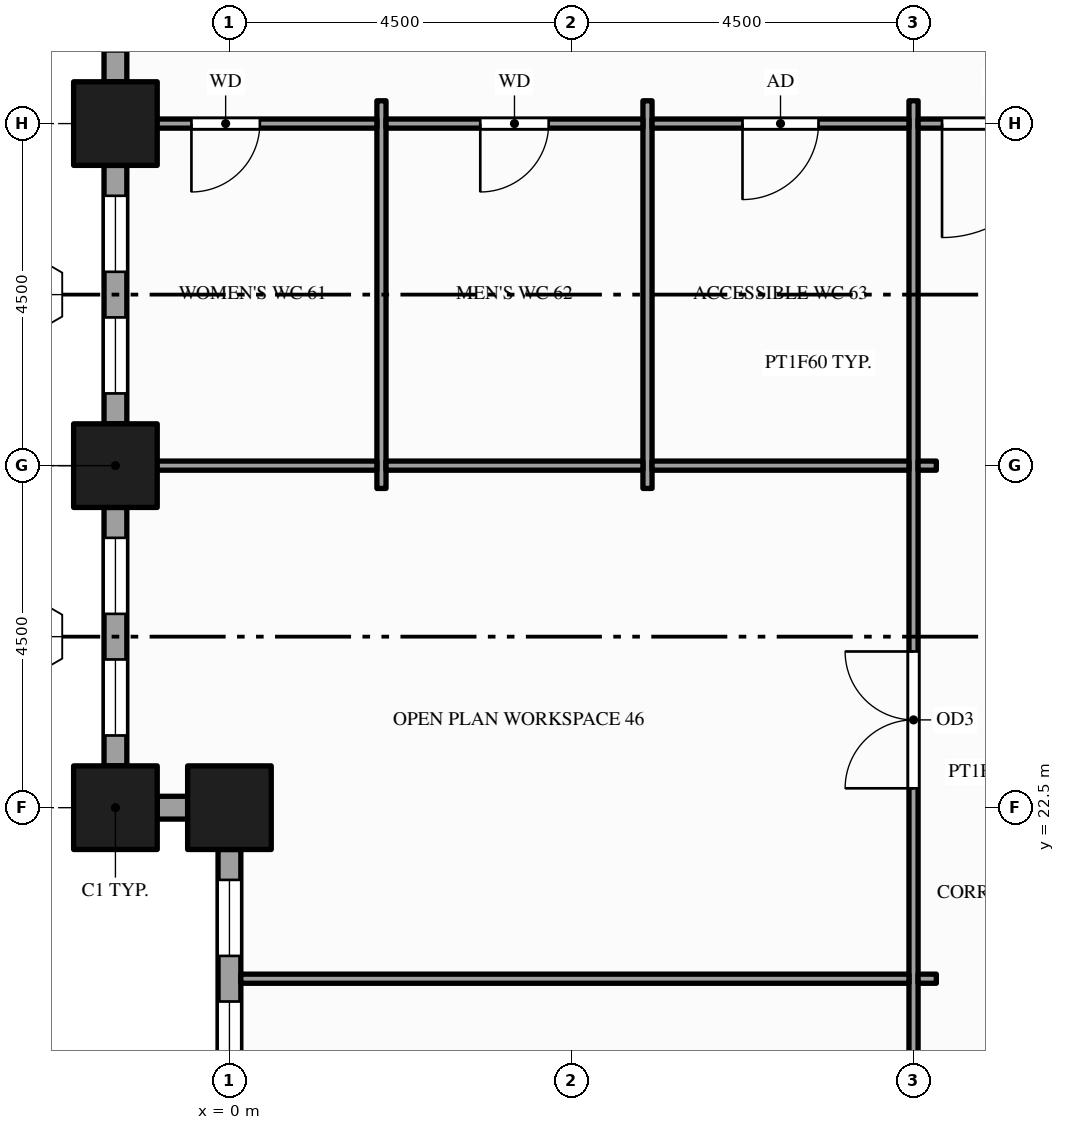
"""IFC4 building model, lengths in metres.
Left out: names, types, materials, properties, quantities, classifications, styles, units other than length and angle.
Written with IfcOpenShell. Run it as: python <this file> out.ifc"""

import sys

from ifc_helpers import new_model, si_unit, direction, frame, frame_2d, origin, origin_2d, place, context, subcontext, project, spatial, rectangle, hollow_rectangle, extrude, element, fill, save


model = new_model("IFC4")
c1 = context("Model", 3, precision=1e-05, world=origin(), true_north=direction((0.0, 1.0)))
c2 = subcontext(c1, "Body", "Model", "MODEL_VIEW")
j1 = project(units=[si_unit("LENGTHUNIT", "METRE"), si_unit("PLANEANGLEUNIT", "RADIAN")], contexts=[c1])
p1 = place(None, origin())
s1 = spatial("IfcSite", under=j1, at=p1, CompositionType="ELEMENT")
p2 = place(p1, origin())
s2 = spatial("IfcBuilding", under=s1, at=p2, CompositionType="ELEMENT")
p3 = place(p2, frame((0.0, 0.0, 33.0)))
s3 = spatial("IfcBuildingStorey", under=s2, at=p3, CompositionType="ELEMENT", Elevation=33.0)
for number, where, z_axis, x_axis in (
    (1, (-1.5, 22.5, -0.15), (0.0, 0.0, 1.0), (1.0, 0.0, 0.0)),
    (2, (-1.5, 27.0, -0.15), (0.0, 0.0, 1.0), (1.0, 0.0, 0.0)),
    (3, (-1.5, 31.5, -0.15), (0.0, 0.0, 1.0), (1.0, 0.0, 0.0)),
    (4, (0.0, 22.5, -0.15), (0.0, 0.0, 1.0), (1.0, 0.0, 0.0)),
):
    element("IfcColumn", number, at=place(p3, frame(where, z_axis=z_axis, x_axis=x_axis)), inside=s3, PredefinedType="COLUMN", context=c2, shape_type="SweptSolid", body=[
        extrude(hollow_rectangle(XDim=1.1, YDim=1.1, WallThickness=0.06, at=origin_2d()), origin(), (0.0, 0.0, 1.0), 4.0),
    ])
p4 = place(p3, frame((-1.5, 35.45, 0.0), z_axis=(0.0, 0.0, 1.0), x_axis=(0.0, -1.0, 0.0)))
e5 = element("IfcWall", 5, at=p4, inside=s3, PredefinedType="STANDARD", context=c2, shape_type="SweptSolid", body=[
    extrude(rectangle(XDim=3.4, YDim=0.3, at=frame_2d((1.7, 0.0))), origin(), (0.0, 0.0, 1.0), 3.144),
])
p5 = place(p4, frame((0.4, 0.0, 0.9)))
e6 = element("IfcOpeningElement", 6, at=p5, cuts=e5, PredefinedType="OPENING", context=c2, shape_type="SweptSolid", body=[
    extrude(rectangle(XDim=1.0, YDim=2.0, at=frame_2d((0.5, 1.0))), frame((0.0, 0.16, 0.0), z_axis=(0.0, -1.0, 0.0), x_axis=(1.0, 0.0, 0.0)), (0.0, 0.0, 1.0), 0.32),
])
p6 = place(p4, frame((2.0, 0.0, 0.9)))
e7 = element("IfcOpeningElement", 7, at=p6, cuts=e5, PredefinedType="OPENING", context=c2, shape_type="SweptSolid", body=[
    extrude(rectangle(XDim=1.0, YDim=2.0, at=frame_2d((0.5, 1.0))), frame((0.0, 0.16, 0.0), z_axis=(0.0, -1.0, 0.0), x_axis=(1.0, 0.0, 0.0)), (0.0, 0.0, 1.0), 0.32),
])
p7 = place(p3, frame((-1.5, 30.95, 0.0), z_axis=(0.0, 0.0, 1.0), x_axis=(0.0, -1.0, 0.0)))
e8 = element("IfcWall", 8, at=p7, inside=s3, PredefinedType="STANDARD", context=c2, shape_type="SweptSolid", body=[
    extrude(rectangle(XDim=3.4, YDim=0.3, at=frame_2d((1.7, 0.0))), origin(), (0.0, 0.0, 1.0), 3.144),
])
p8 = place(p7, frame((0.4, 0.0, 0.9)))
e9 = element("IfcOpeningElement", 9, at=p8, cuts=e8, PredefinedType="OPENING", context=c2, shape_type="SweptSolid", body=[
    extrude(rectangle(XDim=1.0, YDim=2.0, at=frame_2d((0.5, 1.0))), frame((0.0, 0.16, 0.0), z_axis=(0.0, -1.0, 0.0), x_axis=(1.0, 0.0, 0.0)), (0.0, 0.0, 1.0), 0.32),
])
p9 = place(p7, frame((2.0, 0.0, 0.9)))
e10 = element("IfcOpeningElement", 10, at=p9, cuts=e8, PredefinedType="OPENING", context=c2, shape_type="SweptSolid", body=[
    extrude(rectangle(XDim=1.0, YDim=2.0, at=frame_2d((0.5, 1.0))), frame((0.0, 0.16, 0.0), z_axis=(0.0, -1.0, 0.0), x_axis=(1.0, 0.0, 0.0)), (0.0, 0.0, 1.0), 0.32),
])
p10 = place(p3, frame((-1.5, 26.45, 0.0), z_axis=(0.0, 0.0, 1.0), x_axis=(0.0, -1.0, 0.0)))
e11 = element("IfcWall", 11, at=p10, inside=s3, PredefinedType="STANDARD", context=c2, shape_type="SweptSolid", body=[
    extrude(rectangle(XDim=3.4, YDim=0.3, at=frame_2d((1.7, 0.0))), origin(), (0.0, 0.0, 1.0), 3.144),
])
p11 = place(p10, frame((0.4, 0.0, 0.9)))
e12 = element("IfcOpeningElement", 12, at=p11, cuts=e11, PredefinedType="OPENING", context=c2, shape_type="SweptSolid", body=[
    extrude(rectangle(XDim=1.0, YDim=2.0, at=frame_2d((0.5, 1.0))), frame((0.0, 0.16, 0.0), z_axis=(0.0, -1.0, 0.0), x_axis=(1.0, 0.0, 0.0)), (0.0, 0.0, 1.0), 0.32),
])
p12 = place(p10, frame((2.0, 0.0, 0.9)))
e13 = element("IfcOpeningElement", 13, at=p12, cuts=e11, PredefinedType="OPENING", context=c2, shape_type="SweptSolid", body=[
    extrude(rectangle(XDim=1.0, YDim=2.0, at=frame_2d((0.5, 1.0))), frame((0.0, 0.16, 0.0), z_axis=(0.0, -1.0, 0.0), x_axis=(1.0, 0.0, 0.0)), (0.0, 0.0, 1.0), 0.32),
])
p13 = place(p3, frame((-0.95, 22.5, 0.0), z_axis=(0.0, 0.0, 1.0), x_axis=(1.0, 0.0, 0.0)))
e14 = element("IfcWall", 14, at=p13, inside=s3, PredefinedType="STANDARD", context=c2, shape_type="SweptSolid", body=[
    extrude(rectangle(XDim=0.4, YDim=0.3, at=frame_2d((0.2, 0.0))), origin(), (0.0, 0.0, 1.0), 3.144),
])
p14 = place(p3, frame((0.0, 21.95, 0.0), z_axis=(0.0, 0.0, 1.0), x_axis=(0.0, -1.0, 0.0)))
e15 = element("IfcWall", 15, at=p14, inside=s3, PredefinedType="STANDARD", context=c2, shape_type="SweptSolid", body=[
    extrude(rectangle(XDim=3.4, YDim=0.3, at=frame_2d((1.7, 0.0))), origin(), (0.0, 0.0, 1.0), 3.144),
])
p15 = place(p14, frame((0.4, 0.0, 0.9)))
e16 = element("IfcOpeningElement", 16, at=p15, cuts=e15, PredefinedType="OPENING", context=c2, shape_type="SweptSolid", body=[
    extrude(rectangle(XDim=1.0, YDim=2.0, at=frame_2d((0.5, 1.0))), frame((0.0, 0.16, 0.0), z_axis=(0.0, -1.0, 0.0), x_axis=(1.0, 0.0, 0.0)), (0.0, 0.0, 1.0), 0.32),
])
p16 = place(p14, frame((2.0, 0.0, 0.9)))
e17 = element("IfcOpeningElement", 17, at=p16, cuts=e15, PredefinedType="OPENING", context=c2, shape_type="SweptSolid", body=[
    extrude(rectangle(XDim=1.0, YDim=2.0, at=frame_2d((0.5, 1.0))), frame((0.0, 0.16, 0.0), z_axis=(0.0, -1.0, 0.0), x_axis=(1.0, 0.0, 0.0)), (0.0, 0.0, 1.0), 0.32),
])
for number, where, z_axis, x_axis in (
    (18, (2.0, 26.7, 0.0), (0.0, 0.0, 1.0), (0.0, 1.0, 0.0)),
    (19, (5.5, 26.7, 0.0), (0.0, 0.0, 1.0), (0.0, 1.0, 0.0)),
):
    element("IfcWall", number, at=place(p3, frame(where, z_axis=z_axis, x_axis=x_axis)), inside=s3, PredefinedType="PARTITIONING", context=c2, shape_type="SweptSolid", body=[
        extrude(rectangle(XDim=5.1, YDim=0.12, at=frame_2d((2.55, 0.0))), origin(), (0.0, 0.0, 1.0), 3.85),
    ])
p17 = place(p3, frame((9.0, 10.95, 0.0), z_axis=(0.0, 0.0, 1.0), x_axis=(0.0, 1.0, 0.0)))
e20 = element("IfcWall", 20, at=p17, inside=s3, PredefinedType="PARTITIONING", context=c2, shape_type="SweptSolid", body=[
    extrude(rectangle(XDim=20.85, YDim=0.12, at=frame_2d((10.425, 0.0))), origin(), (0.0, 0.0, 1.0), 2.6),
])
p18 = place(p17, frame((2.05, 0.0, 0.0)))
e21 = element("IfcOpeningElement", 21, at=p18, cuts=e20, PredefinedType="OPENING", context=c2, shape_type="SweptSolid", body=[
    extrude(rectangle(XDim=1.0, YDim=2.1, at=frame_2d((0.5, 1.05))), frame((0.0, 0.07, 0.0), z_axis=(0.0, -1.0, 0.0), x_axis=(1.0, 0.0, 0.0)), (0.0, 0.0, 1.0), 0.14),
])
p19 = place(p17, frame((6.6, 0.0, 0.0)))
e22 = element("IfcOpeningElement", 22, at=p19, cuts=e20, PredefinedType="OPENING", context=c2, shape_type="SweptSolid", body=[
    extrude(rectangle(XDim=0.9, YDim=2.1, at=frame_2d((0.45, 1.05))), frame((0.0, 0.07, 0.0), z_axis=(0.0, -1.0, 0.0), x_axis=(1.0, 0.0, 0.0)), (0.0, 0.0, 1.0), 0.14),
])
p20 = place(p17, frame((11.805, 0.0, 0.0)))
e23 = element("IfcOpeningElement", 23, at=p20, cuts=e20, PredefinedType="OPENING", context=c2, shape_type="SweptSolid", body=[
    extrude(rectangle(XDim=1.8, YDim=2.1, at=frame_2d((0.9, 1.05))), frame((0.0, 0.07, 0.0), z_axis=(0.0, -1.0, 0.0), x_axis=(1.0, 0.0, 0.0)), (0.0, 0.0, 1.0), 0.14),
])
p21 = place(p3, frame((0.15, 20.25, 0.0), z_axis=(0.0, 0.0, 1.0), x_axis=(1.0, 0.0, 0.0)))
e24 = element("IfcWall", 24, at=p21, inside=s3, PredefinedType="PARTITIONING", context=c2, shape_type="SweptSolid", body=[
    extrude(rectangle(XDim=8.79, YDim=0.12, at=frame_2d((4.395, 0.0))), origin(), (0.0, 0.0, 1.0), 2.938),
])
p22 = place(p3, frame((9.06, 20.25, 0.0), z_axis=(0.0, 0.0, 1.0), x_axis=(1.0, 0.0, 0.0)))
e25 = element("IfcWall", 25, at=p22, inside=s3, PredefinedType="PARTITIONING", context=c2, shape_type="SweptSolid", body=[
    extrude(rectangle(XDim=0.24, YDim=0.12, at=frame_2d((0.12, 0.0))), origin(), (0.0, 0.0, 1.0), 2.938),
])
p23 = place(p3, frame((-1.35, 27.0, 0.0), z_axis=(0.0, 0.0, 1.0), x_axis=(1.0, 0.0, 0.0)))
e26 = element("IfcWall", 26, at=p23, inside=s3, PredefinedType="PARTITIONING", context=c2, shape_type="SweptSolid", body=[
    extrude(rectangle(XDim=3.29, YDim=0.12, at=frame_2d((1.645, 0.0))), origin(), (0.0, 0.0, 1.0), 2.938),
])
for number, where, z_axis, x_axis in (
    (27, (2.06, 27.0, 0.0), (0.0, 0.0, 1.0), (1.0, 0.0, 0.0)),
    (28, (5.56, 27.0, 0.0), (0.0, 0.0, 1.0), (1.0, 0.0, 0.0)),
):
    element("IfcWall", number, at=place(p3, frame(where, z_axis=z_axis, x_axis=x_axis)), inside=s3, PredefinedType="PARTITIONING", context=c2, shape_type="SweptSolid", body=[
        extrude(rectangle(XDim=3.38, YDim=0.12, at=frame_2d((1.69, 0.0))), origin(), (0.0, 0.0, 1.0), 2.938),
    ])
p24 = place(p3, frame((9.06, 27.0, 0.0), z_axis=(0.0, 0.0, 1.0), x_axis=(1.0, 0.0, 0.0)))
e29 = element("IfcWall", 29, at=p24, inside=s3, PredefinedType="PARTITIONING", context=c2, shape_type="SweptSolid", body=[
    extrude(rectangle(XDim=0.24, YDim=0.12, at=frame_2d((0.12, 0.0))), origin(), (0.0, 0.0, 1.0), 2.938),
])
p25 = place(p3, frame((-1.35, 31.5, 0.0), z_axis=(0.0, 0.0, 1.0), x_axis=(1.0, 0.0, 0.0)))
e30 = element("IfcWall", 30, at=p25, inside=s3, PredefinedType="PARTITIONING", context=c2, shape_type="SweptSolid", body=[
    extrude(rectangle(XDim=3.29, YDim=0.12, at=frame_2d((1.645, 0.0))), origin(), (0.0, 0.0, 1.0), 2.938),
])
p26 = place(p25, frame((0.85, 0.0, 0.0)))
e31 = element("IfcOpeningElement", 31, at=p26, cuts=e30, PredefinedType="OPENING", context=c2, shape_type="SweptSolid", body=[
    extrude(rectangle(XDim=0.9, YDim=2.1, at=frame_2d((0.45, 1.05))), frame((0.0, 0.07, 0.0), z_axis=(0.0, -1.0, 0.0), x_axis=(1.0, 0.0, 0.0)), (0.0, 0.0, 1.0), 0.14),
])
p27 = place(p3, frame((2.06, 31.5, 0.0), z_axis=(0.0, 0.0, 1.0), x_axis=(1.0, 0.0, 0.0)))
e32 = element("IfcWall", 32, at=p27, inside=s3, PredefinedType="PARTITIONING", context=c2, shape_type="SweptSolid", body=[
    extrude(rectangle(XDim=3.38, YDim=0.12, at=frame_2d((1.69, 0.0))), origin(), (0.0, 0.0, 1.0), 2.938),
])
p28 = place(p27, frame((1.24, 0.0, 0.0)))
e33 = element("IfcOpeningElement", 33, at=p28, cuts=e32, PredefinedType="OPENING", context=c2, shape_type="SweptSolid", body=[
    extrude(rectangle(XDim=0.9, YDim=2.1, at=frame_2d((0.45, 1.05))), frame((0.0, 0.07, 0.0), z_axis=(0.0, -1.0, 0.0), x_axis=(1.0, 0.0, 0.0)), (0.0, 0.0, 1.0), 0.14),
])
p29 = place(p3, frame((5.56, 31.5, 0.0), z_axis=(0.0, 0.0, 1.0), x_axis=(1.0, 0.0, 0.0)))
e34 = element("IfcWall", 34, at=p29, inside=s3, PredefinedType="PARTITIONING", context=c2, shape_type="SweptSolid", body=[
    extrude(rectangle(XDim=3.38, YDim=0.12, at=frame_2d((1.69, 0.0))), origin(), (0.0, 0.0, 1.0), 2.938),
])
p30 = place(p29, frame((1.19, 0.0, 0.0)))
e35 = element("IfcOpeningElement", 35, at=p30, cuts=e34, PredefinedType="OPENING", context=c2, shape_type="SweptSolid", body=[
    extrude(rectangle(XDim=1.0, YDim=2.1, at=frame_2d((0.5, 1.05))), frame((0.0, 0.07, 0.0), z_axis=(0.0, -1.0, 0.0), x_axis=(1.0, 0.0, 0.0)), (0.0, 0.0, 1.0), 0.14),
])
p31 = place(p3, frame((9.06, 31.5, 0.0), z_axis=(0.0, 0.0, 1.0), x_axis=(1.0, 0.0, 0.0)))
e36 = element("IfcWall", 36, at=p31, inside=s3, PredefinedType="PARTITIONING", context=c2, shape_type="SweptSolid", body=[
    extrude(rectangle(XDim=2.13, YDim=0.12, at=frame_2d((1.065, 0.0))), origin(), (0.0, 0.0, 1.0), 2.938),
])
p32 = place(p31, frame((0.315, 0.0, 0.0)))
e37 = element("IfcOpeningElement", 37, at=p32, cuts=e36, PredefinedType="OPENING", context=c2, shape_type="SweptSolid", body=[
    extrude(rectangle(XDim=1.5, YDim=2.1, at=frame_2d((0.75, 1.05))), frame((0.0, 0.07, 0.0), z_axis=(0.0, -1.0, 0.0), x_axis=(1.0, 0.0, 0.0)), (0.0, 0.0, 1.0), 0.14),
])
p33 = place(p8, origin())
e38 = element("IfcWindow", 38, at=p33, inside=s3, PartitioningType="SINGLE_PANEL", PredefinedType="WINDOW", context=c2, shape_type="SweptSolid", body=[
    extrude(rectangle(XDim=1.0, YDim=2.0, at=frame_2d((0.5, 1.0))), frame((0.0, 0.03, 0.0), z_axis=(0.0, -1.0, 0.0), x_axis=(1.0, 0.0, 0.0)), (0.0, 0.0, 1.0), 0.06),
])
fill(e9, e38)
p34 = place(p9, origin())
e39 = element("IfcWindow", 39, at=p34, inside=s3, PartitioningType="SINGLE_PANEL", PredefinedType="WINDOW", context=c2, shape_type="SweptSolid", body=[
    extrude(rectangle(XDim=1.0, YDim=2.0, at=frame_2d((0.5, 1.0))), frame((0.0, 0.03, 0.0), z_axis=(0.0, -1.0, 0.0), x_axis=(1.0, 0.0, 0.0)), (0.0, 0.0, 1.0), 0.06),
])
fill(e10, e39)
p35 = place(p11, origin())
e40 = element("IfcWindow", 40, at=p35, inside=s3, PartitioningType="SINGLE_PANEL", PredefinedType="WINDOW", context=c2, shape_type="SweptSolid", body=[
    extrude(rectangle(XDim=1.0, YDim=2.0, at=frame_2d((0.5, 1.0))), frame((0.0, 0.03, 0.0), z_axis=(0.0, -1.0, 0.0), x_axis=(1.0, 0.0, 0.0)), (0.0, 0.0, 1.0), 0.06),
])
fill(e12, e40)
p36 = place(p12, origin())
e41 = element("IfcWindow", 41, at=p36, inside=s3, PartitioningType="SINGLE_PANEL", PredefinedType="WINDOW", context=c2, shape_type="SweptSolid", body=[
    extrude(rectangle(XDim=1.0, YDim=2.0, at=frame_2d((0.5, 1.0))), frame((0.0, 0.03, 0.0), z_axis=(0.0, -1.0, 0.0), x_axis=(1.0, 0.0, 0.0)), (0.0, 0.0, 1.0), 0.06),
])
fill(e13, e41)
p37 = place(p15, origin())
e42 = element("IfcWindow", 42, at=p37, inside=s3, PartitioningType="SINGLE_PANEL", PredefinedType="WINDOW", context=c2, shape_type="SweptSolid", body=[
    extrude(rectangle(XDim=1.0, YDim=2.0, at=frame_2d((0.5, 1.0))), frame((0.0, 0.03, 0.0), z_axis=(0.0, -1.0, 0.0), x_axis=(1.0, 0.0, 0.0)), (0.0, 0.0, 1.0), 0.06),
])
fill(e16, e42)
p38 = place(p16, origin())
e43 = element("IfcWindow", 43, at=p38, inside=s3, PartitioningType="SINGLE_PANEL", PredefinedType="WINDOW", context=c2, shape_type="SweptSolid", body=[
    extrude(rectangle(XDim=1.0, YDim=2.0, at=frame_2d((0.5, 1.0))), frame((0.0, 0.03, 0.0), z_axis=(0.0, -1.0, 0.0), x_axis=(1.0, 0.0, 0.0)), (0.0, 0.0, 1.0), 0.06),
])
fill(e17, e43)
p39 = place(p32, origin())
e44 = element("IfcDoor", 44, at=p39, inside=s3, OperationType="SINGLE_SWING_LEFT", PredefinedType="DOOR", context=c2, shape_type="SweptSolid", body=[
    extrude(rectangle(XDim=1.5, YDim=2.1, at=frame_2d((0.75, 1.05))), frame((0.0, 0.025, 0.0), z_axis=(0.0, -1.0, 0.0), x_axis=(1.0, 0.0, 0.0)), (0.0, 0.0, 1.0), 0.05),
])
fill(e37, e44)
p40 = place(p20, origin())
e45 = element("IfcDoor", 45, at=p40, inside=s3, OperationType="DOUBLE_DOOR_SINGLE_SWING", PredefinedType="DOOR", context=c2, shape_type="SweptSolid", body=[
    extrude(rectangle(XDim=1.8, YDim=2.1, at=frame_2d((0.9, 1.05))), frame((0.0, 0.025, 0.0), z_axis=(0.0, -1.0, 0.0), x_axis=(1.0, 0.0, 0.0)), (0.0, 0.0, 1.0), 0.05),
])
fill(e23, e45)
p41 = place(p26, origin())
e46 = element("IfcDoor", 46, at=p41, inside=s3, OperationType="SINGLE_SWING_LEFT", PredefinedType="DOOR", context=c2, shape_type="SweptSolid", body=[
    extrude(rectangle(XDim=0.9, YDim=2.1, at=frame_2d((0.45, 1.05))), frame((0.0, 0.025, 0.0), z_axis=(0.0, -1.0, 0.0), x_axis=(1.0, 0.0, 0.0)), (0.0, 0.0, 1.0), 0.05),
])
fill(e31, e46)
p42 = place(p28, origin())
e47 = element("IfcDoor", 47, at=p42, inside=s3, OperationType="SINGLE_SWING_LEFT", PredefinedType="DOOR", context=c2, shape_type="SweptSolid", body=[
    extrude(rectangle(XDim=0.9, YDim=2.1, at=frame_2d((0.45, 1.05))), frame((0.0, 0.025, 0.0), z_axis=(0.0, -1.0, 0.0), x_axis=(1.0, 0.0, 0.0)), (0.0, 0.0, 1.0), 0.05),
])
fill(e33, e47)
p43 = place(p30, origin())
e48 = element("IfcDoor", 48, at=p43, inside=s3, OperationType="SINGLE_SWING_LEFT", PredefinedType="DOOR", context=c2, shape_type="SweptSolid", body=[
    extrude(rectangle(XDim=1.0, YDim=2.1, at=frame_2d((0.5, 1.05))), frame((0.0, 0.025, 0.0), z_axis=(0.0, -1.0, 0.0), x_axis=(1.0, 0.0, 0.0)), (0.0, 0.0, 1.0), 0.05),
])
fill(e35, e48)
save(model, sys.argv[1])
